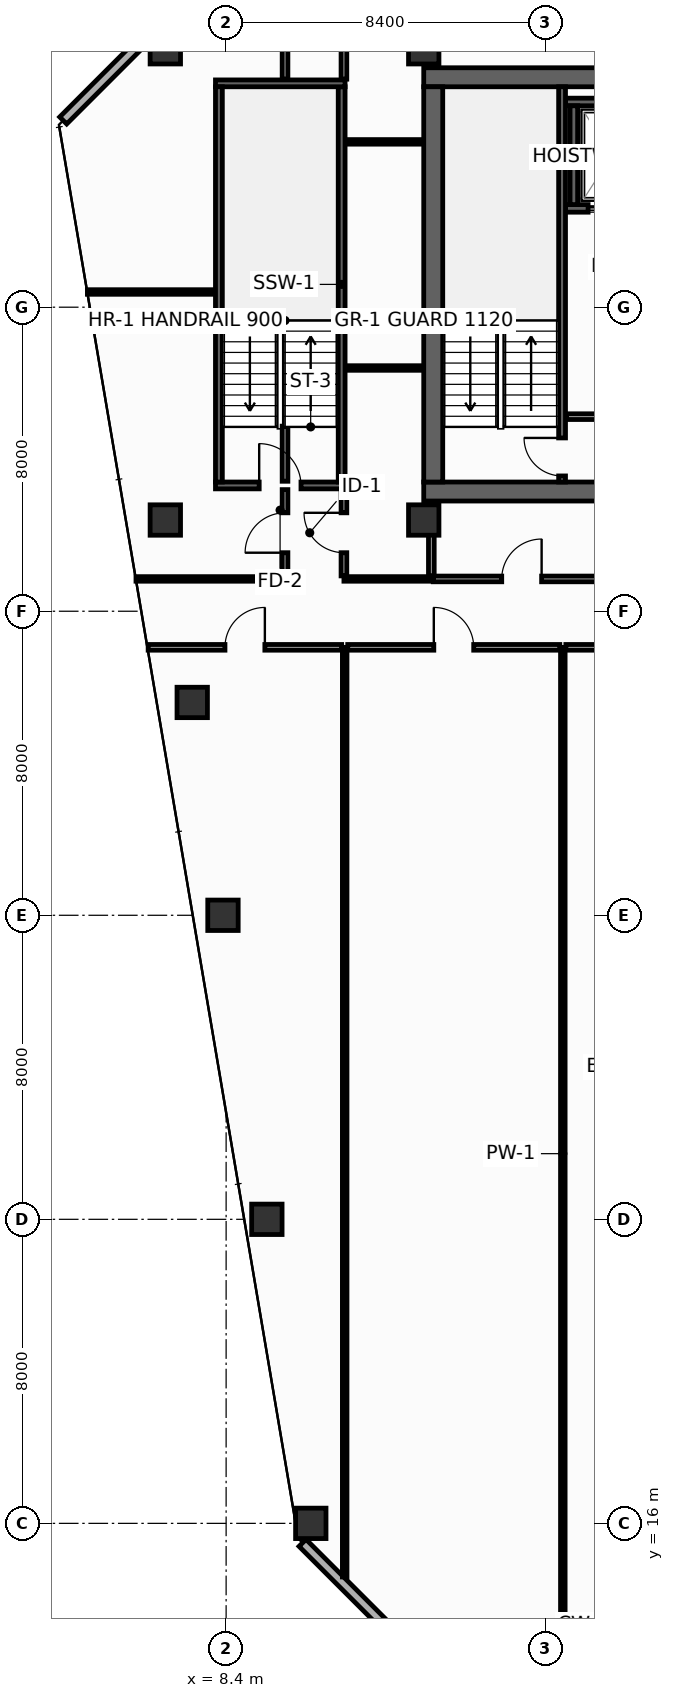
"""IFC4 building model, lengths in metres.
Left out: names, types, materials, properties, quantities, classifications, styles, units other than length and angle.
Written with IfcOpenShell. Run it as: python <this file> out.ifc"""

import sys

from ifc_helpers import new_model, si_unit, direction, frame, frame_2d, origin, origin_2d, place, context, subcontext, project, spatial, rectangle, hollow_rectangle, extrude, element, fill, save


model = new_model("IFC4")
c1 = context("Model", 3, precision=1e-05, world=origin(), true_north=direction((0.0, 1.0)))
c2 = subcontext(c1, "Body", "Model", "MODEL_VIEW")
j1 = project(units=[si_unit("LENGTHUNIT", "METRE"), si_unit("PLANEANGLEUNIT", "RADIAN")], contexts=[c1])
p1 = place(None, origin())
s1 = spatial("IfcSite", under=j1, at=p1, CompositionType="ELEMENT")
p2 = place(p1, origin())
s2 = spatial("IfcBuilding", under=s1, at=p2, CompositionType="ELEMENT")
p3 = place(p2, frame((0.0, 0.0, 209.4)))
s3 = spatial("IfcBuildingStorey", under=s2, at=p3, CompositionType="ELEMENT", Elevation=209.4)
p4 = place(p3, frame((13.6, 43.15, 0.0), z_axis=(0.0, 0.0, 1.0), x_axis=(1.0, 0.0, 0.0)))
e1 = element("IfcWall", 1, at=p4, inside=s3, PredefinedType="SHEAR", context=c2, shape_type="SweptSolid", body=[
    extrude(rectangle(XDim=32.7, YDim=0.5, at=frame_2d((16.35, 0.0))), origin(), (0.0, 0.0, 1.0), 3.55),
])
p5 = place(p4, frame((5.4, 0.0, 0.0)))
e2 = element("IfcOpeningElement", 2, at=p5, cuts=e1, PredefinedType="OPENING", context=c2, shape_type="SweptSolid", body=[
    extrude(rectangle(XDim=1.1, YDim=2.15, at=frame_2d((0.55, 1.075))), frame((0.0, 0.26, 0.0), z_axis=(0.0, -1.0, 0.0), x_axis=(1.0, 0.0, 0.0)), (0.0, 0.0, 1.0), 0.52),
])
p6 = place(p4, frame((25.6, 0.0, 0.0)))
e3 = element("IfcOpeningElement", 3, at=p6, cuts=e1, PredefinedType="OPENING", context=c2, shape_type="SweptSolid", body=[
    extrude(rectangle(XDim=1.1, YDim=2.15, at=frame_2d((0.55, 1.075))), frame((0.0, 0.26, 0.0), z_axis=(0.0, -1.0, 0.0), x_axis=(1.0, 0.0, 0.0)), (0.0, 0.0, 1.0), 0.52),
])
p7 = place(p3, frame((13.6, 54.05, 0.0), z_axis=(0.0, 0.0, 1.0), x_axis=(1.0, 0.0, 0.0)))
e4 = element("IfcWall", 4, at=p7, inside=s3, PredefinedType="SHEAR", context=c2, shape_type="SweptSolid", body=[
    extrude(rectangle(XDim=32.7, YDim=0.5, at=frame_2d((16.35, 0.0))), origin(), (0.0, 0.0, 1.0), 3.55),
])
p8 = place(p3, frame((13.85, 43.4, 0.0), z_axis=(0.0, 0.0, 1.0), x_axis=(0.0, 1.0, 0.0)))
e5 = element("IfcWall", 5, at=p8, inside=s3, PredefinedType="SHEAR", context=c2, shape_type="SweptSolid", body=[
    extrude(rectangle(XDim=10.4, YDim=0.5, at=frame_2d((5.2, 0.0))), origin(), (0.0, 0.0, 1.0), 3.55),
])
for number, where, z_axis, x_axis in (
    (6, (6.8, 54.8, 0.0), (0.0, 0.0, 1.0), (1.0, 0.0, 0.0)),
    (7, (13.6, 54.8, 0.0), (0.0, 0.0, 1.0), (1.0, 0.0, 0.0)),
    (8, (6.8, 42.4, 0.0), (0.0, 0.0, 1.0), (1.0, 0.0, 0.0)),
    (9, (13.6, 42.4, 0.0), (0.0, 0.0, 1.0), (1.0, 0.0, 0.0)),
    (10, (10.628, 16.0, 0.0), (0.0, 0.0, 1.0), (1.0, 0.0, 0.0)),
    (11, (9.472, 24.0, 0.0), (0.0, 0.0, 1.0), (1.0, 0.0, 0.0)),
    (12, (8.317, 32.0, 0.0), (0.0, 0.0, 1.0), (1.0, 0.0, 0.0)),
    (13, (7.508, 37.6, 0.0), (0.0, 0.0, 1.0), (1.0, 0.0, 0.0)),
):
    element("IfcColumn", number, at=place(p3, frame(where, z_axis=z_axis, x_axis=x_axis)), inside=s3, PredefinedType="COLUMN", context=c2, shape_type="SweptSolid", body=[
        extrude(hollow_rectangle(XDim=0.8, YDim=0.8, WallThickness=0.036, at=origin_2d()), origin(), (0.0, 0.0, 1.0), 3.8),
    ])
p9 = place(p3, frame((17.33, 50.6, 0.0), z_axis=(0.0, 0.0, 1.0), x_axis=(1.0, 0.0, 0.0)))
e14 = element("IfcWall", 14, at=p9, inside=s3, PredefinedType="SHEAR", context=c2, shape_type="SweptSolid", body=[
    extrude(rectangle(XDim=2.52, YDim=0.2, at=frame_2d((1.26, 0.0))), origin(), (0.0, 0.0, 1.0), 3.55),
])
p10 = place(p9, frame((0.595, 0.0, 0.0)))
e15 = element("IfcOpeningElement", 15, at=p10, cuts=e14, PredefinedType="OPENING", context=c2, shape_type="SweptSolid", body=[
    extrude(rectangle(XDim=1.25, YDim=2.3, at=frame_2d((0.625, 1.15))), frame((0.0, 0.11, 0.0), z_axis=(0.0, -1.0, 0.0), x_axis=(1.0, 0.0, 0.0)), (0.0, 0.0, 1.0), 0.22),
])
p11 = place(p3, frame((17.33, 53.4, 0.0), z_axis=(0.0, 0.0, 1.0), x_axis=(1.0, 0.0, 0.0)))
e16 = element("IfcWall", 16, at=p11, inside=s3, PredefinedType="SHEAR", context=c2, shape_type="SweptSolid", body=[
    extrude(rectangle(XDim=2.52, YDim=0.2, at=frame_2d((1.26, 0.0))), origin(), (0.0, 0.0, 1.0), 3.55),
])
p12 = place(p3, frame((17.55, 50.7, 0.0), z_axis=(0.0, 0.0, 1.0), x_axis=(0.0, 1.0, 0.0)))
e17 = element("IfcWall", 17, at=p12, inside=s3, PredefinedType="SHEAR", context=c2, shape_type="SweptSolid", body=[
    extrude(rectangle(XDim=2.6, YDim=0.2, at=frame_2d((1.3, 0.0))), origin(), (0.0, 0.0, 1.0), 3.55),
])
p13 = place(p3, frame((17.24, 43.4, 0.0), z_axis=(0.0, 0.0, 1.0), x_axis=(0.0, 1.0, 0.0)))
e18 = element("IfcWall", 18, at=p13, inside=s3, PredefinedType="SHEAR", context=c2, shape_type="SweptSolid", body=[
    extrude(rectangle(XDim=10.4, YDim=0.18, at=frame_2d((5.2, 0.0))), origin(), (0.0, 0.0, 1.0), 3.55),
])
p14 = place(p13, frame((0.16, 0.0, 0.0)))
e19 = element("IfcOpeningElement", 19, at=p14, cuts=e18, PredefinedType="OPENING", context=c2, shape_type="SweptSolid", body=[
    extrude(rectangle(XDim=1.0, YDim=2.15, at=frame_2d((0.5, 1.075))), frame((0.0, 0.1, 0.0), z_axis=(0.0, -1.0, 0.0), x_axis=(1.0, 0.0, 0.0)), (0.0, 0.0, 1.0), 0.2),
])
p15 = place(p3, frame((8.12, 43.31, 0.0), z_axis=(0.0, 0.0, 1.0), x_axis=(1.0, 0.0, 0.0)))
e20 = element("IfcWall", 20, at=p15, inside=s3, PredefinedType="SHEAR", context=c2, shape_type="SweptSolid", body=[
    extrude(rectangle(XDim=3.41, YDim=0.18, at=frame_2d((1.705, 0.0))), origin(), (0.0, 0.0, 1.0), 3.55),
])
p16 = place(p15, frame((1.15, 0.0, 0.0)))
e21 = element("IfcOpeningElement", 21, at=p16, cuts=e20, PredefinedType="OPENING", context=c2, shape_type="SweptSolid", body=[
    extrude(rectangle(XDim=1.1, YDim=2.15, at=frame_2d((0.55, 1.075))), frame((0.0, 0.1, 0.0), z_axis=(0.0, -1.0, 0.0), x_axis=(1.0, 0.0, 0.0)), (0.0, 0.0, 1.0), 0.2),
])
p17 = place(p3, frame((11.44, 43.4, 0.0), z_axis=(0.0, 0.0, 1.0), x_axis=(0.0, 1.0, 0.0)))
e22 = element("IfcWall", 22, at=p17, inside=s3, PredefinedType="SHEAR", context=c2, shape_type="SweptSolid", body=[
    extrude(rectangle(XDim=10.4, YDim=0.18, at=frame_2d((5.2, 0.0))), origin(), (0.0, 0.0, 1.0), 3.55),
])
p18 = place(p3, frame((11.53, 53.89, 0.0), z_axis=(0.0, 0.0, 1.0), x_axis=(-1.0, 0.0, 0.0)))
e23 = element("IfcWall", 23, at=p18, inside=s3, PredefinedType="SHEAR", context=c2, shape_type="SweptSolid", body=[
    extrude(rectangle(XDim=3.41, YDim=0.18, at=frame_2d((1.705, 0.0))), origin(), (0.0, 0.0, 1.0), 3.55),
])
p19 = place(p3, frame((8.21, 53.8, 0.0), z_axis=(0.0, 0.0, 1.0), x_axis=(0.0, -1.0, 0.0)))
e24 = element("IfcWall", 24, at=p19, inside=s3, PredefinedType="SHEAR", context=c2, shape_type="SweptSolid", body=[
    extrude(rectangle(XDim=10.4, YDim=0.18, at=frame_2d((5.2, 0.0))), origin(), (0.0, 0.0, 1.0), 3.55),
])
p20 = place(p3, frame((17.36, 45.12, 0.0), z_axis=(0.0, 0.0, 1.0), x_axis=(1.0, 0.0, 0.0)))
e25 = element("IfcWall", 25, at=p20, inside=s3, PredefinedType="PARTITIONING", context=c2, shape_type="SweptSolid", body=[
    extrude(rectangle(XDim=5.14, YDim=0.15, at=frame_2d((2.57, 0.0))), origin(), (0.0, 0.0, 1.0), 3.55),
])
p21 = place(p20, frame((1.8, 0.0, 0.0)))
e26 = element("IfcOpeningElement", 26, at=p21, cuts=e25, PredefinedType="OPENING", context=c2, shape_type="SweptSolid", body=[
    extrude(rectangle(XDim=1.1, YDim=2.15, at=frame_2d((0.55, 1.075))), frame((0.0, 0.085, 0.0), z_axis=(0.0, -1.0, 0.0), x_axis=(1.0, 0.0, 0.0)), (0.0, 0.0, 1.0), 0.17),
])
p22 = place(p3, frame((10.411, 15.487, 0.0), z_axis=(0.0, 0.0, 1.0), x_axis=(0.707135806771, -0.70707775441, 0.0)))
e27 = element("IfcWall", 27, at=p22, inside=s3, PredefinedType="STANDARD", context=c2, shape_type="SweptSolid", body=[
    extrude(rectangle(XDim=4.206, YDim=0.26, at=frame_2d((2.103, 0.0))), origin(), (0.0, 0.0, 1.0), 3.55),
])
p23 = place(p3, frame((7.087, 55.887, 0.0), z_axis=(0.0, 0.0, 1.0), x_axis=(-0.707106781187, -0.707106781187, 0.0)))
e28 = element("IfcWall", 28, at=p23, inside=s3, PredefinedType="STANDARD", context=c2, shape_type="SweptSolid", body=[
    extrude(rectangle(XDim=4.206, YDim=0.26, at=frame_2d((2.103, 0.0))), origin(), (0.0, 0.0, 1.0), 3.55),
])
p24 = place(p3, frame((6.028, 40.85, 0.0), z_axis=(0.0, 0.0, 1.0), x_axis=(1.0, 0.0, 0.0)))
e29 = element("IfcWall", 29, at=p24, inside=s3, PredefinedType="PARTITIONING", context=c2, shape_type="SweptSolid", body=[
    extrude(rectangle(XDim=3.922, YDim=0.12, at=frame_2d((1.961, 0.0))), origin(), (0.0, 0.0, 1.0), 3.035),
])
p25 = place(p3, frame((11.5, 40.85, 0.0), z_axis=(0.0, 0.0, 1.0), x_axis=(1.0, 0.0, 0.0)))
e30 = element("IfcWall", 30, at=p25, inside=s3, PredefinedType="PARTITIONING", context=c2, shape_type="SweptSolid", body=[
    extrude(rectangle(XDim=2.35, YDim=0.12, at=frame_2d((1.175, 0.0))), origin(), (0.0, 0.0, 1.0), 3.55),
])
p26 = place(p3, frame((11.55, 52.35, 0.0), z_axis=(0.0, 0.0, 1.0), x_axis=(1.0, 0.0, 0.0)))
e31 = element("IfcWall", 31, at=p26, inside=s3, PredefinedType="PARTITIONING", context=c2, shape_type="SweptSolid", body=[
    extrude(rectangle(XDim=2.03, YDim=0.12, at=frame_2d((1.015, 0.0))), origin(), (0.0, 0.0, 1.0), 3.55),
])
p27 = place(p3, frame((11.5, 54.0, 0.0), z_axis=(0.0, 0.0, 1.0), x_axis=(0.0, 1.0, 0.0)))
e32 = element("IfcWall", 32, at=p27, inside=s3, PredefinedType="PARTITIONING", context=c2, shape_type="SweptSolid", body=[
    extrude(rectangle(XDim=1.995, YDim=0.15, at=frame_2d((0.998, 0.0))), origin(), (0.0, 0.0, 1.0), 2.935),
])
p28 = place(p3, frame((4.75, 48.4, 0.0), z_axis=(0.0, 0.0, 1.0), x_axis=(1.0, 0.0, 0.0)))
e33 = element("IfcWall", 33, at=p28, inside=s3, PredefinedType="PARTITIONING", context=c2, shape_type="SweptSolid", body=[
    extrude(rectangle(XDim=3.35, YDim=0.12, at=frame_2d((1.675, 0.0))), origin(), (0.0, 0.0, 1.0), 2.835),
])
p29 = place(p3, frame((9.95, 40.93, 0.0), z_axis=(0.0, 0.0, 1.0), x_axis=(0.0, 1.0, 0.0)))
e34 = element("IfcWall", 34, at=p29, inside=s3, PredefinedType="PARTITIONING", context=c2, shape_type="SweptSolid", body=[
    extrude(rectangle(XDim=2.27, YDim=0.15, at=frame_2d((1.135, 0.0))), origin(), (0.0, 0.0, 1.0), 2.835),
])
p30 = place(p29, frame((0.61, 0.0, 0.0)))
e35 = element("IfcOpeningElement", 35, at=p30, cuts=e34, PredefinedType="OPENING", context=c2, shape_type="SweptSolid", body=[
    extrude(rectangle(XDim=1.05, YDim=2.15, at=frame_2d((0.525, 1.075))), frame((0.0, 0.085, 0.0), z_axis=(0.0, -1.0, 0.0), x_axis=(1.0, 0.0, 0.0)), (0.0, 0.0, 1.0), 0.17),
])
p31 = place(p3, frame((9.95, 43.42, 0.0), z_axis=(0.0, 0.0, 1.0), x_axis=(0.0, 1.0, 0.0)))
e36 = element("IfcWall", 36, at=p31, inside=s3, PredefinedType="PARTITIONING", context=c2, shape_type="SweptSolid", body=[
    extrude(rectangle(XDim=1.45, YDim=0.15, at=frame_2d((0.725, 0.0))), origin(), (0.0, 0.0, 1.0), 3.55),
])
p32 = place(p3, frame((9.95, 54.0, 0.0), z_axis=(0.0, 0.0, 1.0), x_axis=(0.0, 1.0, 0.0)))
e37 = element("IfcWall", 37, at=p32, inside=s3, PredefinedType="PARTITIONING", context=c2, shape_type="SweptSolid", body=[
    extrude(rectangle(XDim=1.995, YDim=0.15, at=frame_2d((0.998, 0.0))), origin(), (0.0, 0.0, 1.0), 2.935),
])
p33 = place(p3, frame((11.55, 46.4, 0.0), z_axis=(0.0, 0.0, 1.0), x_axis=(1.0, 0.0, 0.0)))
e38 = element("IfcWall", 38, at=p33, inside=s3, PredefinedType="PARTITIONING", context=c2, shape_type="SweptSolid", body=[
    extrude(rectangle(XDim=2.03, YDim=0.12, at=frame_2d((1.015, 0.0))), origin(), (0.0, 0.0, 1.0), 3.55),
])
p34 = place(p3, frame((11.5, 40.93, 0.0), z_axis=(0.0, 0.0, 1.0), x_axis=(0.0, 1.0, 0.0)))
e39 = element("IfcWall", 39, at=p34, inside=s3, PredefinedType="PARTITIONING", context=c2, shape_type="SweptSolid", body=[
    extrude(rectangle(XDim=2.27, YDim=0.15, at=frame_2d((1.135, 0.0))), origin(), (0.0, 0.0, 1.0), 2.835),
])
p35 = place(p34, frame((0.61, 0.0, 0.0)))
e40 = element("IfcOpeningElement", 40, at=p35, cuts=e39, PredefinedType="OPENING", context=c2, shape_type="SweptSolid", body=[
    extrude(rectangle(XDim=1.05, YDim=2.15, at=frame_2d((0.525, 1.075))), frame((0.0, 0.085, 0.0), z_axis=(0.0, -1.0, 0.0), x_axis=(1.0, 0.0, 0.0)), (0.0, 0.0, 1.0), 0.17),
])
p36 = place(p3, frame((13.8, 40.93, 0.0), z_axis=(0.0, 0.0, 1.0), x_axis=(0.0, 1.0, 0.0)))
e41 = element("IfcWall", 41, at=p36, inside=s3, PredefinedType="PARTITIONING", context=c2, shape_type="SweptSolid", body=[
    extrude(rectangle(XDim=1.95, YDim=0.15, at=frame_2d((0.975, 0.0))), origin(), (0.0, 0.0, 1.0), 3.55),
])
p37 = place(p3, frame((13.85, 40.85, 0.0), z_axis=(0.0, 0.0, 1.0), x_axis=(1.0, 0.0, 0.0)))
e42 = element("IfcWall", 42, at=p37, inside=s3, PredefinedType="PARTITIONING", context=c2, shape_type="SweptSolid", body=[
    extrude(rectangle(XDim=4.655, YDim=0.15, at=frame_2d((2.327, 0.0))), origin(), (0.0, 0.0, 1.0), 3.55),
])
p38 = place(p37, frame((1.802, 0.0, 0.0)))
e43 = element("IfcOpeningElement", 43, at=p38, cuts=e42, PredefinedType="OPENING", context=c2, shape_type="SweptSolid", body=[
    extrude(rectangle(XDim=1.05, YDim=2.15, at=frame_2d((0.525, 1.075))), frame((0.0, 0.085, 0.0), z_axis=(0.0, -1.0, 0.0), x_axis=(1.0, 0.0, 0.0)), (0.0, 0.0, 1.0), 0.17),
])
p39 = place(p3, frame((11.52, 14.59, 0.0), z_axis=(0.0, 0.0, 1.0), x_axis=(0.0, 1.0, 0.0)))
e44 = element("IfcWall", 44, at=p39, inside=s3, PredefinedType="PARTITIONING", context=c2, shape_type="SweptSolid", body=[
    extrude(rectangle(XDim=24.46, YDim=0.12, at=frame_2d((12.23, 0.0))), origin(), (0.0, 0.0, 1.0), 2.835),
])
p40 = place(p3, frame((17.26, 12.405, 0.0), z_axis=(0.0, 0.0, 1.0), x_axis=(0.0, 1.0, 0.0)))
e45 = element("IfcWall", 45, at=p40, inside=s3, PredefinedType="PARTITIONING", context=c2, shape_type="SweptSolid", body=[
    extrude(rectangle(XDim=26.645, YDim=0.12, at=frame_2d((13.323, 0.0))), origin(), (0.0, 0.0, 1.0), 2.835),
])
p41 = place(p3, frame((6.348, 39.05, 0.0), z_axis=(0.0, 0.0, 1.0), x_axis=(1.0, 0.0, 0.0)))
e46 = element("IfcWall", 46, at=p41, inside=s3, PredefinedType="PARTITIONING", context=c2, shape_type="SweptSolid", body=[
    extrude(rectangle(XDim=5.092, YDim=0.15, at=frame_2d((2.546, 0.0))), origin(), (0.0, 0.0, 1.0), 3.035),
])
p42 = place(p41, frame((2.021, 0.0, 0.0)))
e47 = element("IfcOpeningElement", 47, at=p42, cuts=e46, PredefinedType="OPENING", context=c2, shape_type="SweptSolid", body=[
    extrude(rectangle(XDim=1.05, YDim=2.15, at=frame_2d((0.525, 1.075))), frame((0.0, 0.085, 0.0), z_axis=(0.0, -1.0, 0.0), x_axis=(1.0, 0.0, 0.0)), (0.0, 0.0, 1.0), 0.17),
])
p43 = place(p3, frame((11.6, 39.05, 0.0), z_axis=(0.0, 0.0, 1.0), x_axis=(1.0, 0.0, 0.0)))
e48 = element("IfcWall", 48, at=p43, inside=s3, PredefinedType="PARTITIONING", context=c2, shape_type="SweptSolid", body=[
    extrude(rectangle(XDim=5.58, YDim=0.15, at=frame_2d((2.79, 0.0))), origin(), (0.0, 0.0, 1.0), 3.55),
])
p44 = place(p43, frame((2.265, 0.0, 0.0)))
e49 = element("IfcOpeningElement", 49, at=p44, cuts=e48, PredefinedType="OPENING", context=c2, shape_type="SweptSolid", body=[
    extrude(rectangle(XDim=1.05, YDim=2.15, at=frame_2d((0.525, 1.075))), frame((0.0, 0.085, 0.0), z_axis=(0.0, -1.0, 0.0), x_axis=(1.0, 0.0, 0.0)), (0.0, 0.0, 1.0), 0.17),
])
p45 = place(p3, frame((17.34, 39.05, 0.0), z_axis=(0.0, 0.0, 1.0), x_axis=(1.0, 0.0, 0.0)))
e50 = element("IfcWall", 50, at=p45, inside=s3, PredefinedType="PARTITIONING", context=c2, shape_type="SweptSolid", body=[
    extrude(rectangle(XDim=6.51, YDim=0.15, at=frame_2d((3.255, 0.0))), origin(), (0.0, 0.0, 1.0), 2.835),
])
p46 = place(p45, frame((2.73, 0.0, 0.0)))
e51 = element("IfcOpeningElement", 51, at=p46, cuts=e50, PredefinedType="OPENING", context=c2, shape_type="SweptSolid", body=[
    extrude(rectangle(XDim=1.05, YDim=2.15, at=frame_2d((0.525, 1.075))), frame((0.0, 0.085, 0.0), z_axis=(0.0, -1.0, 0.0), x_axis=(1.0, 0.0, 0.0)), (0.0, 0.0, 1.0), 0.17),
])
p47 = place(p10, origin())
e52 = element("IfcDoor", 52, at=p47, inside=s3, OperationType="SLIDING_TO_LEFT", PredefinedType="DOOR", context=c2, shape_type="SweptSolid", body=[
    extrude(rectangle(XDim=1.25, YDim=2.3, at=frame_2d((0.625, 1.15))), frame((0.0, 0.025, 0.0), z_axis=(0.0, -1.0, 0.0), x_axis=(1.0, 0.0, 0.0)), (0.0, 0.0, 1.0), 0.05),
])
fill(e15, e52)
p48 = place(p14, origin())
e53 = element("IfcDoor", 53, at=p48, inside=s3, OperationType="SINGLE_SWING_RIGHT", PredefinedType="DOOR", context=c2, shape_type="SweptSolid", body=[
    extrude(rectangle(XDim=1.0, YDim=2.15, at=frame_2d((0.5, 1.075))), frame((0.0, 0.025, 0.0), z_axis=(0.0, -1.0, 0.0), x_axis=(1.0, 0.0, 0.0)), (0.0, 0.0, 1.0), 0.05),
])
fill(e19, e53)
p49 = place(p16, origin())
e54 = element("IfcDoor", 54, at=p49, inside=s3, OperationType="SINGLE_SWING_LEFT", PredefinedType="DOOR", context=c2, shape_type="SweptSolid", body=[
    extrude(rectangle(XDim=1.1, YDim=2.15, at=frame_2d((0.55, 1.075))), frame((0.0, 0.025, 0.0), z_axis=(0.0, -1.0, 0.0), x_axis=(1.0, 0.0, 0.0)), (0.0, 0.0, 1.0), 0.05),
])
fill(e21, e54)
p50 = place(p30, origin())
e55 = element("IfcDoor", 55, at=p50, inside=s3, OperationType="SINGLE_SWING_LEFT", PredefinedType="DOOR", context=c2, shape_type="SweptSolid", body=[
    extrude(rectangle(XDim=1.05, YDim=2.15, at=frame_2d((0.525, 1.075))), frame((0.0, 0.025, 0.0), z_axis=(0.0, -1.0, 0.0), x_axis=(1.0, 0.0, 0.0)), (0.0, 0.0, 1.0), 0.05),
])
fill(e35, e55)
p51 = place(p35, origin())
e56 = element("IfcDoor", 56, at=p51, inside=s3, OperationType="SINGLE_SWING_RIGHT", PredefinedType="DOOR", context=c2, shape_type="SweptSolid", body=[
    extrude(rectangle(XDim=1.05, YDim=2.15, at=frame_2d((0.525, 1.075))), frame((0.0, 0.025, 0.0), z_axis=(0.0, -1.0, 0.0), x_axis=(1.0, 0.0, 0.0)), (0.0, 0.0, 1.0), 0.05),
])
fill(e40, e56)
p52 = place(p38, origin())
e57 = element("IfcDoor", 57, at=p52, inside=s3, OperationType="SINGLE_SWING_RIGHT", PredefinedType="DOOR", context=c2, shape_type="SweptSolid", body=[
    extrude(rectangle(XDim=1.05, YDim=2.15, at=frame_2d((0.525, 1.075))), frame((0.0, 0.025, 0.0), z_axis=(0.0, -1.0, 0.0), x_axis=(1.0, 0.0, 0.0)), (0.0, 0.0, 1.0), 0.05),
])
fill(e43, e57)
p53 = place(p42, origin())
e58 = element("IfcDoor", 58, at=p53, inside=s3, OperationType="SINGLE_SWING_RIGHT", PredefinedType="DOOR", context=c2, shape_type="SweptSolid", body=[
    extrude(rectangle(XDim=1.05, YDim=2.15, at=frame_2d((0.525, 1.075))), frame((0.0, 0.025, 0.0), z_axis=(0.0, -1.0, 0.0), x_axis=(1.0, 0.0, 0.0)), (0.0, 0.0, 1.0), 0.05),
])
fill(e47, e58)
p54 = place(p44, origin())
e59 = element("IfcDoor", 59, at=p54, inside=s3, OperationType="SINGLE_SWING_LEFT", PredefinedType="DOOR", context=c2, shape_type="SweptSolid", body=[
    extrude(rectangle(XDim=1.05, YDim=2.15, at=frame_2d((0.525, 1.075))), frame((0.0, 0.025, 0.0), z_axis=(0.0, -1.0, 0.0), x_axis=(1.0, 0.0, 0.0)), (0.0, 0.0, 1.0), 0.05),
])
fill(e49, e59)
save(model, sys.argv[1])
